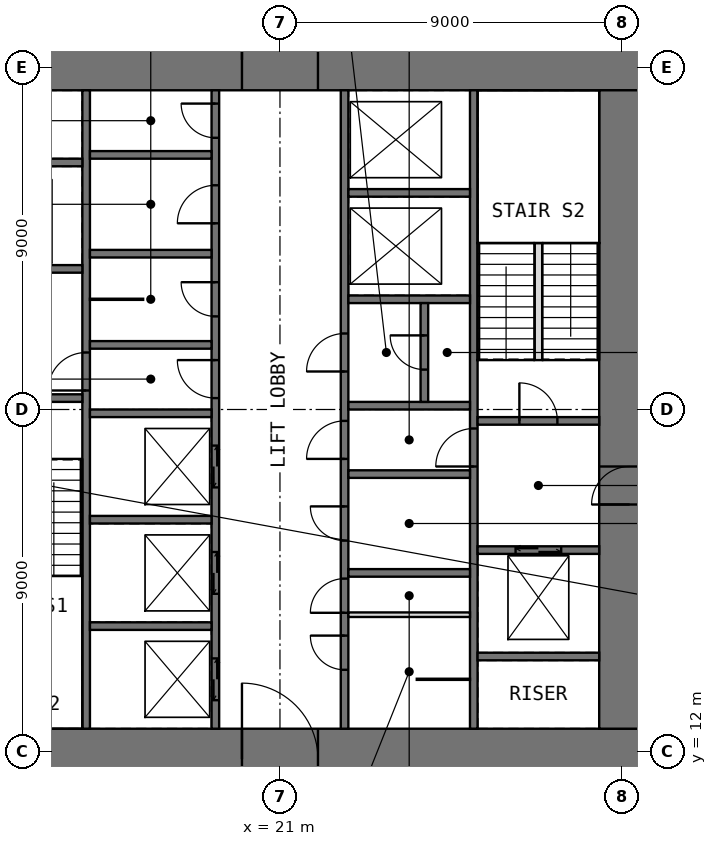
"""IFC4 building model, lengths in metres.
Left out: names, types, materials, properties, quantities, classifications, styles, units other than length and angle.
Written with IfcOpenShell. Run it as: python <this file> out.ifc"""

import sys

from ifc_helpers import new_model, si_unit, direction, frame, frame_2d, origin, place, context, subcontext, project, spatial, rectangle, extrude, element, fill, save


model = new_model("IFC4")
c1 = context("Model", 3, precision=1e-05, world=origin(), true_north=direction((0.0, 1.0)))
c2 = subcontext(c1, "Body", "Model", "MODEL_VIEW")
j1 = project(units=[si_unit("LENGTHUNIT", "METRE"), si_unit("PLANEANGLEUNIT", "RADIAN")], contexts=[c1])
p1 = place(None, origin())
s1 = spatial("IfcSite", under=j1, at=p1, CompositionType="ELEMENT")
p2 = place(p1, origin())
s2 = spatial("IfcBuilding", under=s1, at=p2, CompositionType="ELEMENT")
p3 = place(p2, frame((0.0, 0.0, 96.5)))
s3 = spatial("IfcBuildingStorey", under=s2, at=p3, CompositionType="ELEMENT", Elevation=96.5)
p4 = place(p3, frame((11.0, 11.8, -0.05), z_axis=(0.0, 0.0, 1.0), x_axis=(1.0, 0.0, 0.0)))
e1 = element("IfcWall", 1, at=p4, inside=s3, PredefinedType="SHEAR", context=c2, shape_type="SweptSolid", body=[
    extrude(rectangle(XDim=20.0, YDim=1.6, at=frame_2d((10.0, 0.0))), origin(), (0.0, 0.0, 1.0), 4.0),
])
p5 = place(p4, frame((9.0, 0.0, 0.05)))
e2 = element("IfcOpeningElement", 2, at=p5, cuts=e1, PredefinedType="OPENING", context=c2, shape_type="SweptSolid", body=[
    extrude(rectangle(XDim=2.0, YDim=2.2, at=frame_2d((1.0, 1.1))), frame((0.0, 0.81, 0.0), z_axis=(0.0, -1.0, 0.0), x_axis=(1.0, 0.0, 0.0)), (0.0, 0.0, 1.0), 1.62),
])
p6 = place(p3, frame((11.0, 30.2, -0.05), z_axis=(0.0, 0.0, 1.0), x_axis=(1.0, 0.0, 0.0)))
e3 = element("IfcWall", 3, at=p6, inside=s3, PredefinedType="SHEAR", context=c2, shape_type="SweptSolid", body=[
    extrude(rectangle(XDim=20.0, YDim=1.6, at=frame_2d((10.0, 0.0))), origin(), (0.0, 0.0, 1.0), 4.0),
])
p7 = place(p6, frame((9.0, 0.0, 0.05)))
e4 = element("IfcOpeningElement", 4, at=p7, cuts=e3, PredefinedType="OPENING", context=c2, shape_type="SweptSolid", body=[
    extrude(rectangle(XDim=2.0, YDim=2.2, at=frame_2d((1.0, 1.1))), frame((0.0, 0.81, 0.0), z_axis=(0.0, -1.0, 0.0), x_axis=(1.0, 0.0, 0.0)), (0.0, 0.0, 1.0), 1.62),
])
p8 = place(p3, frame((30.2, 12.6, -0.05), z_axis=(0.0, 0.0, 1.0), x_axis=(0.0, 1.0, 0.0)))
e5 = element("IfcWall", 5, at=p8, inside=s3, PredefinedType="SHEAR", context=c2, shape_type="SweptSolid", body=[
    extrude(rectangle(XDim=16.8, YDim=1.6, at=frame_2d((8.4, 0.0))), origin(), (0.0, 0.0, 1.0), 4.0),
])
p9 = place(p8, frame((5.9, 0.0, 0.05)))
e6 = element("IfcOpeningElement", 6, at=p9, cuts=e5, PredefinedType="OPENING", context=c2, shape_type="SweptSolid", body=[
    extrude(rectangle(XDim=1.0, YDim=2.2, at=frame_2d((0.5, 1.1))), frame((0.0, 0.81, 0.0), z_axis=(0.0, -1.0, 0.0), x_axis=(1.0, 0.0, 0.0)), (0.0, 0.0, 1.0), 1.62),
])
p10 = place(p3, frame((15.9, 12.6, -0.05), z_axis=(0.0, 0.0, 1.0), x_axis=(0.0, 1.0, 0.0)))
e7 = element("IfcWall", 7, at=p10, inside=s3, PredefinedType="SHEAR", context=c2, shape_type="SweptSolid", body=[
    extrude(rectangle(XDim=16.8, YDim=0.2, at=frame_2d((8.4, 0.0))), origin(), (0.0, 0.0, 1.0), 4.0),
])
p11 = place(p10, frame((8.9, 0.0, 0.05)))
e8 = element("IfcOpeningElement", 8, at=p11, cuts=e7, PredefinedType="OPENING", context=c2, shape_type="SweptSolid", body=[
    extrude(rectangle(XDim=1.0, YDim=2.2, at=frame_2d((0.5, 1.1))), frame((0.0, 0.11, 0.0), z_axis=(0.0, -1.0, 0.0), x_axis=(1.0, 0.0, 0.0)), (0.0, 0.0, 1.0), 0.22),
])
p12 = place(p3, frame((19.3, 12.6, -0.05), z_axis=(0.0, 0.0, 1.0), x_axis=(0.0, 1.0, 0.0)))
e9 = element("IfcWall", 9, at=p12, inside=s3, PredefinedType="SHEAR", context=c2, shape_type="SweptSolid", body=[
    extrude(rectangle(XDim=16.8, YDim=0.2, at=frame_2d((8.4, 0.0))), origin(), (0.0, 0.0, 1.0), 4.0),
])
p13 = place(p12, frame((8.7, 0.0, 0.05)))
e10 = element("IfcOpeningElement", 10, at=p13, cuts=e9, PredefinedType="OPENING", context=c2, shape_type="SweptSolid", body=[
    extrude(rectangle(XDim=1.0, YDim=2.2, at=frame_2d((0.5, 1.1))), frame((0.0, 0.11, 0.0), z_axis=(0.0, -1.0, 0.0), x_axis=(1.0, 0.0, 0.0)), (0.0, 0.0, 1.0), 0.22),
])
p14 = place(p12, frame((10.85, 0.0, 0.05)))
e11 = element("IfcOpeningElement", 11, at=p14, cuts=e9, PredefinedType="OPENING", context=c2, shape_type="SweptSolid", body=[
    extrude(rectangle(XDim=0.9, YDim=2.2, at=frame_2d((0.45, 1.1))), frame((0.0, 0.11, 0.0), z_axis=(0.0, -1.0, 0.0), x_axis=(1.0, 0.0, 0.0)), (0.0, 0.0, 1.0), 0.22),
])
p15 = place(p12, frame((13.3, 0.0, 0.05)))
e12 = element("IfcOpeningElement", 12, at=p15, cuts=e9, PredefinedType="OPENING", context=c2, shape_type="SweptSolid", body=[
    extrude(rectangle(XDim=1.0, YDim=2.2, at=frame_2d((0.5, 1.1))), frame((0.0, 0.11, 0.0), z_axis=(0.0, -1.0, 0.0), x_axis=(1.0, 0.0, 0.0)), (0.0, 0.0, 1.0), 0.22),
])
p16 = place(p12, frame((15.55, 0.0, 0.05)))
e13 = element("IfcOpeningElement", 13, at=p16, cuts=e9, PredefinedType="OPENING", context=c2, shape_type="SweptSolid", body=[
    extrude(rectangle(XDim=0.9, YDim=2.2, at=frame_2d((0.45, 1.1))), frame((0.0, 0.11, 0.0), z_axis=(0.0, -1.0, 0.0), x_axis=(1.0, 0.0, 0.0)), (0.0, 0.0, 1.0), 0.22),
])
p17 = place(p12, frame((0.75, 0.0, 0.05)))
e14 = element("IfcOpeningElement", 14, at=p17, cuts=e9, PredefinedType="OPENING", context=c2, shape_type="SweptSolid", body=[
    extrude(rectangle(XDim=1.1, YDim=2.2, at=frame_2d((0.55, 1.1))), frame((0.0, 0.11, 0.0), z_axis=(0.0, -1.0, 0.0), x_axis=(1.0, 0.0, 0.0)), (0.0, 0.0, 1.0), 0.22),
])
p18 = place(p12, frame((3.55, 0.0, 0.05)))
e15 = element("IfcOpeningElement", 15, at=p18, cuts=e9, PredefinedType="OPENING", context=c2, shape_type="SweptSolid", body=[
    extrude(rectangle(XDim=1.1, YDim=2.2, at=frame_2d((0.55, 1.1))), frame((0.0, 0.11, 0.0), z_axis=(0.0, -1.0, 0.0), x_axis=(1.0, 0.0, 0.0)), (0.0, 0.0, 1.0), 0.22),
])
p19 = place(p12, frame((6.35, 0.0, 0.05)))
e16 = element("IfcOpeningElement", 16, at=p19, cuts=e9, PredefinedType="OPENING", context=c2, shape_type="SweptSolid", body=[
    extrude(rectangle(XDim=1.1, YDim=2.2, at=frame_2d((0.55, 1.1))), frame((0.0, 0.11, 0.0), z_axis=(0.0, -1.0, 0.0), x_axis=(1.0, 0.0, 0.0)), (0.0, 0.0, 1.0), 0.22),
])
p20 = place(p3, frame((22.7, 12.6, -0.05), z_axis=(0.0, 0.0, 1.0), x_axis=(0.0, 1.0, 0.0)))
e17 = element("IfcWall", 17, at=p20, inside=s3, PredefinedType="SHEAR", context=c2, shape_type="SweptSolid", body=[
    extrude(rectangle(XDim=16.8, YDim=0.2, at=frame_2d((8.4, 0.0))), origin(), (0.0, 0.0, 1.0), 4.0),
])
p21 = place(p20, frame((3.05, 0.0, 0.05)))
e18 = element("IfcOpeningElement", 18, at=p21, cuts=e17, PredefinedType="OPENING", context=c2, shape_type="SweptSolid", body=[
    extrude(rectangle(XDim=0.9, YDim=2.2, at=frame_2d((0.45, 1.1))), frame((0.0, 0.11, 0.0), z_axis=(0.0, -1.0, 0.0), x_axis=(1.0, 0.0, 0.0)), (0.0, 0.0, 1.0), 0.22),
])
p22 = place(p20, frame((7.1, 0.0, 0.05)))
e19 = element("IfcOpeningElement", 19, at=p22, cuts=e17, PredefinedType="OPENING", context=c2, shape_type="SweptSolid", body=[
    extrude(rectangle(XDim=1.0, YDim=2.2, at=frame_2d((0.5, 1.1))), frame((0.0, 0.11, 0.0), z_axis=(0.0, -1.0, 0.0), x_axis=(1.0, 0.0, 0.0)), (0.0, 0.0, 1.0), 0.22),
])
p23 = place(p20, frame((1.55, 0.0, 0.05)))
e20 = element("IfcOpeningElement", 20, at=p23, cuts=e17, PredefinedType="OPENING", context=c2, shape_type="SweptSolid", body=[
    extrude(rectangle(XDim=0.9, YDim=2.2, at=frame_2d((0.45, 1.1))), frame((0.0, 0.11, 0.0), z_axis=(0.0, -1.0, 0.0), x_axis=(1.0, 0.0, 0.0)), (0.0, 0.0, 1.0), 0.22),
])
p24 = place(p20, frame((4.95, 0.0, 0.05)))
e21 = element("IfcOpeningElement", 21, at=p24, cuts=e17, PredefinedType="OPENING", context=c2, shape_type="SweptSolid", body=[
    extrude(rectangle(XDim=0.9, YDim=2.2, at=frame_2d((0.45, 1.1))), frame((0.0, 0.11, 0.0), z_axis=(0.0, -1.0, 0.0), x_axis=(1.0, 0.0, 0.0)), (0.0, 0.0, 1.0), 0.22),
])
p25 = place(p20, frame((9.4, 0.0, 0.05)))
e22 = element("IfcOpeningElement", 22, at=p25, cuts=e17, PredefinedType="OPENING", context=c2, shape_type="SweptSolid", body=[
    extrude(rectangle(XDim=1.0, YDim=2.2, at=frame_2d((0.5, 1.1))), frame((0.0, 0.11, 0.0), z_axis=(0.0, -1.0, 0.0), x_axis=(1.0, 0.0, 0.0)), (0.0, 0.0, 1.0), 0.22),
])
p26 = place(p3, frame((26.1, 12.6, -0.05), z_axis=(0.0, 0.0, 1.0), x_axis=(0.0, 1.0, 0.0)))
e23 = element("IfcWall", 23, at=p26, inside=s3, PredefinedType="SHEAR", context=c2, shape_type="SweptSolid", body=[
    extrude(rectangle(XDim=16.8, YDim=0.2, at=frame_2d((8.4, 0.0))), origin(), (0.0, 0.0, 1.0), 4.0),
])
p27 = place(p26, frame((6.9, 0.0, 0.05)))
e24 = element("IfcOpeningElement", 24, at=p27, cuts=e23, PredefinedType="OPENING", context=c2, shape_type="SweptSolid", body=[
    extrude(rectangle(XDim=1.0, YDim=2.2, at=frame_2d((0.5, 1.1))), frame((0.0, 0.11, 0.0), z_axis=(0.0, -1.0, 0.0), x_axis=(1.0, 0.0, 0.0)), (0.0, 0.0, 1.0), 0.22),
])
p28 = place(p3, frame((12.6, 21.3, -0.05), z_axis=(0.0, 0.0, 1.0), x_axis=(1.0, 0.0, 0.0)))
e25 = element("IfcWall", 25, at=p28, inside=s3, PredefinedType="SHEAR", context=c2, shape_type="SweptSolid", body=[
    extrude(rectangle(XDim=3.2, YDim=0.2, at=frame_2d((1.6, 0.0))), origin(), (0.0, 0.0, 1.0), 4.0),
])
p29 = place(p28, frame((1.1, 0.0, 0.05)))
e26 = element("IfcOpeningElement", 26, at=p29, cuts=e25, PredefinedType="OPENING", context=c2, shape_type="SweptSolid", body=[
    extrude(rectangle(XDim=1.0, YDim=2.2, at=frame_2d((0.5, 1.1))), frame((0.0, 0.11, 0.0), z_axis=(0.0, -1.0, 0.0), x_axis=(1.0, 0.0, 0.0)), (0.0, 0.0, 1.0), 0.22),
])
p30 = place(p3, frame((12.6, 24.7, -0.05), z_axis=(0.0, 0.0, 1.0), x_axis=(1.0, 0.0, 0.0)))
e27 = element("IfcWall", 27, at=p30, inside=s3, PredefinedType="SHEAR", context=c2, shape_type="SweptSolid", body=[
    extrude(rectangle(XDim=3.2, YDim=0.2, at=frame_2d((1.6, 0.0))), origin(), (0.0, 0.0, 1.0), 4.0),
])
p31 = place(p30, frame((1.0, 0.0, 0.05)))
e28 = element("IfcOpeningElement", 28, at=p31, cuts=e27, PredefinedType="OPENING", context=c2, shape_type="SweptSolid", body=[
    extrude(rectangle(XDim=1.2, YDim=2.2, at=frame_2d((0.6, 1.1))), frame((0.0, 0.11, 0.0), z_axis=(0.0, -1.0, 0.0), x_axis=(1.0, 0.0, 0.0)), (0.0, 0.0, 1.0), 0.22),
])
for number, where, z_axis, x_axis in (
    (29, (12.6, 27.5, -0.05), (0.0, 0.0, 1.0), (1.0, 0.0, 0.0)),
    (30, (16.0, 15.3, -0.05), (0.0, 0.0, 1.0), (1.0, 0.0, 0.0)),
    (31, (16.0, 18.1, -0.05), (0.0, 0.0, 1.0), (1.0, 0.0, 0.0)),
    (32, (16.0, 20.9, -0.05), (0.0, 0.0, 1.0), (1.0, 0.0, 0.0)),
    (33, (16.0, 22.7, -0.05), (0.0, 0.0, 1.0), (1.0, 0.0, 0.0)),
    (34, (16.0, 25.1, -0.05), (0.0, 0.0, 1.0), (1.0, 0.0, 0.0)),
    (35, (16.0, 27.7, -0.05), (0.0, 0.0, 1.0), (1.0, 0.0, 0.0)),
    (36, (22.8, 16.7, -0.05), (0.0, 0.0, 1.0), (1.0, 0.0, 0.0)),
    (37, (22.8, 19.3, -0.05), (0.0, 0.0, 1.0), (1.0, 0.0, 0.0)),
    (38, (22.8, 21.1, -0.05), (0.0, 0.0, 1.0), (1.0, 0.0, 0.0)),
    (39, (22.8, 23.9, -0.05), (0.0, 0.0, 1.0), (1.0, 0.0, 0.0)),
    (40, (22.8, 26.7, -0.05), (0.0, 0.0, 1.0), (1.0, 0.0, 0.0)),
    (41, (26.2, 14.5, -0.05), (0.0, 0.0, 1.0), (1.0, 0.0, 0.0)),
):
    element("IfcWall", number, at=place(p3, frame(where, z_axis=z_axis, x_axis=x_axis)), inside=s3, PredefinedType="SHEAR", context=c2, shape_type="SweptSolid", body=[
        extrude(rectangle(XDim=3.2, YDim=0.2, at=frame_2d((1.6, 0.0))), origin(), (0.0, 0.0, 1.0), 4.0),
    ])
p32 = place(p3, frame((26.2, 17.3, -0.05), z_axis=(0.0, 0.0, 1.0), x_axis=(1.0, 0.0, 0.0)))
e42 = element("IfcWall", 42, at=p32, inside=s3, PredefinedType="SHEAR", context=c2, shape_type="SweptSolid", body=[
    extrude(rectangle(XDim=3.2, YDim=0.2, at=frame_2d((1.6, 0.0))), origin(), (0.0, 0.0, 1.0), 4.0),
])
p33 = place(p32, frame((1.0, 0.0, 0.05)))
e43 = element("IfcOpeningElement", 43, at=p33, cuts=e42, PredefinedType="OPENING", context=c2, shape_type="SweptSolid", body=[
    extrude(rectangle(XDim=1.2, YDim=2.2, at=frame_2d((0.6, 1.1))), frame((0.0, 0.11, 0.0), z_axis=(0.0, -1.0, 0.0), x_axis=(1.0, 0.0, 0.0)), (0.0, 0.0, 1.0), 0.22),
])
p34 = place(p3, frame((26.2, 20.7, -0.05), z_axis=(0.0, 0.0, 1.0), x_axis=(1.0, 0.0, 0.0)))
e44 = element("IfcWall", 44, at=p34, inside=s3, PredefinedType="SHEAR", context=c2, shape_type="SweptSolid", body=[
    extrude(rectangle(XDim=3.2, YDim=0.2, at=frame_2d((1.6, 0.0))), origin(), (0.0, 0.0, 1.0), 4.0),
])
p35 = place(p34, frame((1.1, 0.0, 0.05)))
e45 = element("IfcOpeningElement", 45, at=p35, cuts=e44, PredefinedType="OPENING", context=c2, shape_type="SweptSolid", body=[
    extrude(rectangle(XDim=1.0, YDim=2.2, at=frame_2d((0.5, 1.1))), frame((0.0, 0.11, 0.0), z_axis=(0.0, -1.0, 0.0), x_axis=(1.0, 0.0, 0.0)), (0.0, 0.0, 1.0), 0.22),
])
p36 = place(p3, frame((22.8, 15.6, 0.0), z_axis=(0.0, 0.0, 1.0), x_axis=(1.0, 0.0, 0.0)))
e46 = element("IfcWall", 46, at=p36, inside=s3, PredefinedType="PARTITIONING", context=c2, shape_type="SweptSolid", body=[
    extrude(rectangle(XDim=3.2, YDim=0.12, at=frame_2d((1.6, 0.0))), origin(), (0.0, 0.0, 1.0), 3.75),
])
for number, where, z_axis, x_axis in (
    (47, (24.6, 13.9, 0.0), (0.0, 0.0, 1.0), (1.0, 0.0, 0.0)),
    (48, (16.0, 23.9, 0.0), (0.0, 0.0, 1.0), (1.0, 0.0, 0.0)),
):
    element("IfcWall", number, at=place(p3, frame(where, z_axis=z_axis, x_axis=x_axis)), inside=s3, PredefinedType="PARTITIONING", context=c2, shape_type="SweptSolid", body=[
        extrude(rectangle(XDim=1.4, YDim=0.03, at=frame_2d((0.7, 0.0))), origin(), (0.0, 0.0, 1.0), 3.75),
    ])
p37 = place(p3, frame((24.8, 21.2, -0.05), z_axis=(0.0, 0.0, 1.0), x_axis=(0.0, 1.0, 0.0)))
e49 = element("IfcWall", 49, at=p37, inside=s3, PredefinedType="SHEAR", context=c2, shape_type="SweptSolid", body=[
    extrude(rectangle(XDim=2.6, YDim=0.2, at=frame_2d((1.3, 0.0))), origin(), (0.0, 0.0, 1.0), 4.0),
])
p38 = place(p37, frame((0.85, 0.0, 0.05)))
e50 = element("IfcOpeningElement", 50, at=p38, cuts=e49, PredefinedType="OPENING", context=c2, shape_type="SweptSolid", body=[
    extrude(rectangle(XDim=0.9, YDim=2.2, at=frame_2d((0.45, 1.1))), frame((0.0, 0.11, 0.0), z_axis=(0.0, -1.0, 0.0), x_axis=(1.0, 0.0, 0.0)), (0.0, 0.0, 1.0), 0.22),
])
p39 = place(p3, frame((27.8, 22.3, 0.0), z_axis=(0.0, 0.0, 1.0), x_axis=(0.0, 1.0, 0.0)))
e51 = element("IfcWall", 51, at=p39, inside=s3, PredefinedType="PARTITIONING", context=c2, shape_type="SweptSolid", body=[
    extrude(rectangle(XDim=3.08, YDim=0.2, at=frame_2d((1.54, 0.0))), origin(), (0.0, 0.0, 1.0), 4.0),
])
p40 = place(p5, origin())
e52 = element("IfcDoor", 52, at=p40, inside=s3, OperationType="DOUBLE_DOOR_SINGLE_SWING", PredefinedType="DOOR", context=c2, shape_type="SweptSolid", body=[
    extrude(rectangle(XDim=2.0, YDim=2.2, at=frame_2d((1.0, 1.1))), frame((0.0, 0.025, 0.0), z_axis=(0.0, -1.0, 0.0), x_axis=(1.0, 0.0, 0.0)), (0.0, 0.0, 1.0), 0.05),
])
fill(e2, e52)
p41 = place(p7, origin())
e53 = element("IfcDoor", 53, at=p41, inside=s3, OperationType="DOUBLE_DOOR_SINGLE_SWING", PredefinedType="DOOR", context=c2, shape_type="SweptSolid", body=[
    extrude(rectangle(XDim=2.0, YDim=2.2, at=frame_2d((1.0, 1.1))), frame((0.0, 0.025, 0.0), z_axis=(0.0, -1.0, 0.0), x_axis=(1.0, 0.0, 0.0)), (0.0, 0.0, 1.0), 0.05),
])
fill(e4, e53)
p42 = place(p21, origin())
e54 = element("IfcDoor", 54, at=p42, inside=s3, OperationType="SINGLE_SWING_LEFT", PredefinedType="DOOR", context=c2, shape_type="SweptSolid", body=[
    extrude(rectangle(XDim=0.9, YDim=2.2, at=frame_2d((0.45, 1.1))), frame((0.0, 0.025, 0.0), z_axis=(0.0, -1.0, 0.0), x_axis=(1.0, 0.0, 0.0)), (0.0, 0.0, 1.0), 0.05),
])
fill(e18, e54)
p43 = place(p9, origin())
e55 = element("IfcDoor", 55, at=p43, inside=s3, OperationType="SINGLE_SWING_LEFT", PredefinedType="DOOR", context=c2, shape_type="SweptSolid", body=[
    extrude(rectangle(XDim=1.0, YDim=2.2, at=frame_2d((0.5, 1.1))), frame((0.0, 0.025, 0.0), z_axis=(0.0, -1.0, 0.0), x_axis=(1.0, 0.0, 0.0)), (0.0, 0.0, 1.0), 0.05),
])
fill(e6, e55)
p44 = place(p35, origin())
e56 = element("IfcDoor", 56, at=p44, inside=s3, OperationType="SINGLE_SWING_LEFT", PredefinedType="DOOR", context=c2, shape_type="SweptSolid", body=[
    extrude(rectangle(XDim=1.0, YDim=2.2, at=frame_2d((0.5, 1.1))), frame((0.0, 0.025, 0.0), z_axis=(0.0, -1.0, 0.0), x_axis=(1.0, 0.0, 0.0)), (0.0, 0.0, 1.0), 0.05),
])
fill(e45, e56)
p45 = place(p11, origin())
e57 = element("IfcDoor", 57, at=p45, inside=s3, OperationType="SINGLE_SWING_LEFT", PredefinedType="DOOR", context=c2, shape_type="SweptSolid", body=[
    extrude(rectangle(XDim=1.0, YDim=2.2, at=frame_2d((0.5, 1.1))), frame((0.0, 0.025, 0.0), z_axis=(0.0, -1.0, 0.0), x_axis=(1.0, 0.0, 0.0)), (0.0, 0.0, 1.0), 0.05),
])
fill(e8, e57)
p46 = place(p27, origin())
e58 = element("IfcDoor", 58, at=p46, inside=s3, OperationType="SINGLE_SWING_LEFT", PredefinedType="DOOR", context=c2, shape_type="SweptSolid", body=[
    extrude(rectangle(XDim=1.0, YDim=2.2, at=frame_2d((0.5, 1.1))), frame((0.0, 0.025, 0.0), z_axis=(0.0, -1.0, 0.0), x_axis=(1.0, 0.0, 0.0)), (0.0, 0.0, 1.0), 0.05),
])
fill(e24, e58)
p47 = place(p13, origin())
e59 = element("IfcDoor", 59, at=p47, inside=s3, OperationType="SINGLE_SWING_RIGHT", PredefinedType="DOOR", context=c2, shape_type="SweptSolid", body=[
    extrude(rectangle(XDim=1.0, YDim=2.2, at=frame_2d((0.5, 1.1))), frame((0.0, 0.025, 0.0), z_axis=(0.0, -1.0, 0.0), x_axis=(1.0, 0.0, 0.0)), (0.0, 0.0, 1.0), 0.05),
])
fill(e10, e59)
p48 = place(p22, origin())
e60 = element("IfcDoor", 60, at=p48, inside=s3, OperationType="SINGLE_SWING_LEFT", PredefinedType="DOOR", context=c2, shape_type="SweptSolid", body=[
    extrude(rectangle(XDim=1.0, YDim=2.2, at=frame_2d((0.5, 1.1))), frame((0.0, 0.025, 0.0), z_axis=(0.0, -1.0, 0.0), x_axis=(1.0, 0.0, 0.0)), (0.0, 0.0, 1.0), 0.05),
])
fill(e19, e60)
p49 = place(p14, origin())
e61 = element("IfcDoor", 61, at=p49, inside=s3, OperationType="SINGLE_SWING_RIGHT", PredefinedType="DOOR", context=c2, shape_type="SweptSolid", body=[
    extrude(rectangle(XDim=0.9, YDim=2.2, at=frame_2d((0.45, 1.1))), frame((0.0, 0.025, 0.0), z_axis=(0.0, -1.0, 0.0), x_axis=(1.0, 0.0, 0.0)), (0.0, 0.0, 1.0), 0.05),
])
fill(e11, e61)
p50 = place(p15, origin())
e62 = element("IfcDoor", 62, at=p50, inside=s3, OperationType="SINGLE_SWING_LEFT", PredefinedType="DOOR", context=c2, shape_type="SweptSolid", body=[
    extrude(rectangle(XDim=1.0, YDim=2.2, at=frame_2d((0.5, 1.1))), frame((0.0, 0.025, 0.0), z_axis=(0.0, -1.0, 0.0), x_axis=(1.0, 0.0, 0.0)), (0.0, 0.0, 1.0), 0.05),
])
fill(e12, e62)
p51 = place(p16, origin())
e63 = element("IfcDoor", 63, at=p51, inside=s3, OperationType="SINGLE_SWING_RIGHT", PredefinedType="DOOR", context=c2, shape_type="SweptSolid", body=[
    extrude(rectangle(XDim=0.9, YDim=2.2, at=frame_2d((0.45, 1.1))), frame((0.0, 0.025, 0.0), z_axis=(0.0, -1.0, 0.0), x_axis=(1.0, 0.0, 0.0)), (0.0, 0.0, 1.0), 0.05),
])
fill(e13, e63)
p52 = place(p23, origin())
e64 = element("IfcDoor", 64, at=p52, inside=s3, OperationType="SINGLE_SWING_RIGHT", PredefinedType="DOOR", context=c2, shape_type="SweptSolid", body=[
    extrude(rectangle(XDim=0.9, YDim=2.2, at=frame_2d((0.45, 1.1))), frame((0.0, 0.025, 0.0), z_axis=(0.0, -1.0, 0.0), x_axis=(1.0, 0.0, 0.0)), (0.0, 0.0, 1.0), 0.05),
])
fill(e20, e64)
p53 = place(p24, origin())
e65 = element("IfcDoor", 65, at=p53, inside=s3, OperationType="SINGLE_SWING_RIGHT", PredefinedType="DOOR", context=c2, shape_type="SweptSolid", body=[
    extrude(rectangle(XDim=0.9, YDim=2.2, at=frame_2d((0.45, 1.1))), frame((0.0, 0.025, 0.0), z_axis=(0.0, -1.0, 0.0), x_axis=(1.0, 0.0, 0.0)), (0.0, 0.0, 1.0), 0.05),
])
fill(e21, e65)
p54 = place(p25, origin())
e66 = element("IfcDoor", 66, at=p54, inside=s3, OperationType="SINGLE_SWING_LEFT", PredefinedType="DOOR", context=c2, shape_type="SweptSolid", body=[
    extrude(rectangle(XDim=1.0, YDim=2.2, at=frame_2d((0.5, 1.1))), frame((0.0, 0.025, 0.0), z_axis=(0.0, -1.0, 0.0), x_axis=(1.0, 0.0, 0.0)), (0.0, 0.0, 1.0), 0.05),
])
fill(e22, e66)
p55 = place(p38, origin())
e67 = element("IfcDoor", 67, at=p55, inside=s3, OperationType="SINGLE_SWING_RIGHT", PredefinedType="DOOR", context=c2, shape_type="SweptSolid", body=[
    extrude(rectangle(XDim=0.9, YDim=2.2, at=frame_2d((0.45, 1.1))), frame((0.0, 0.025, 0.0), z_axis=(0.0, -1.0, 0.0), x_axis=(1.0, 0.0, 0.0)), (0.0, 0.0, 1.0), 0.05),
])
fill(e50, e67)
p56 = place(p17, origin())
e68 = element("IfcDoor", 68, at=p56, inside=s3, OperationType="DOUBLE_DOOR_SLIDING", PredefinedType="DOOR", context=c2, shape_type="SweptSolid", body=[
    extrude(rectangle(XDim=1.1, YDim=2.2, at=frame_2d((0.55, 1.1))), frame((0.0, 0.025, 0.0), z_axis=(0.0, -1.0, 0.0), x_axis=(1.0, 0.0, 0.0)), (0.0, 0.0, 1.0), 0.05),
])
fill(e14, e68)
p57 = place(p18, origin())
e69 = element("IfcDoor", 69, at=p57, inside=s3, OperationType="DOUBLE_DOOR_SLIDING", PredefinedType="DOOR", context=c2, shape_type="SweptSolid", body=[
    extrude(rectangle(XDim=1.1, YDim=2.2, at=frame_2d((0.55, 1.1))), frame((0.0, 0.025, 0.0), z_axis=(0.0, -1.0, 0.0), x_axis=(1.0, 0.0, 0.0)), (0.0, 0.0, 1.0), 0.05),
])
fill(e15, e69)
p58 = place(p19, origin())
e70 = element("IfcDoor", 70, at=p58, inside=s3, OperationType="DOUBLE_DOOR_SLIDING", PredefinedType="DOOR", context=c2, shape_type="SweptSolid", body=[
    extrude(rectangle(XDim=1.1, YDim=2.2, at=frame_2d((0.55, 1.1))), frame((0.0, 0.025, 0.0), z_axis=(0.0, -1.0, 0.0), x_axis=(1.0, 0.0, 0.0)), (0.0, 0.0, 1.0), 0.05),
])
fill(e16, e70)
p59 = place(p33, origin())
e71 = element("IfcDoor", 71, at=p59, inside=s3, OperationType="DOUBLE_DOOR_SLIDING", PredefinedType="DOOR", context=c2, shape_type="SweptSolid", body=[
    extrude(rectangle(XDim=1.2, YDim=2.2, at=frame_2d((0.6, 1.1))), frame((0.0, 0.025, 0.0), z_axis=(0.0, -1.0, 0.0), x_axis=(1.0, 0.0, 0.0)), (0.0, 0.0, 1.0), 0.05),
])
fill(e43, e71)
save(model, sys.argv[1])
